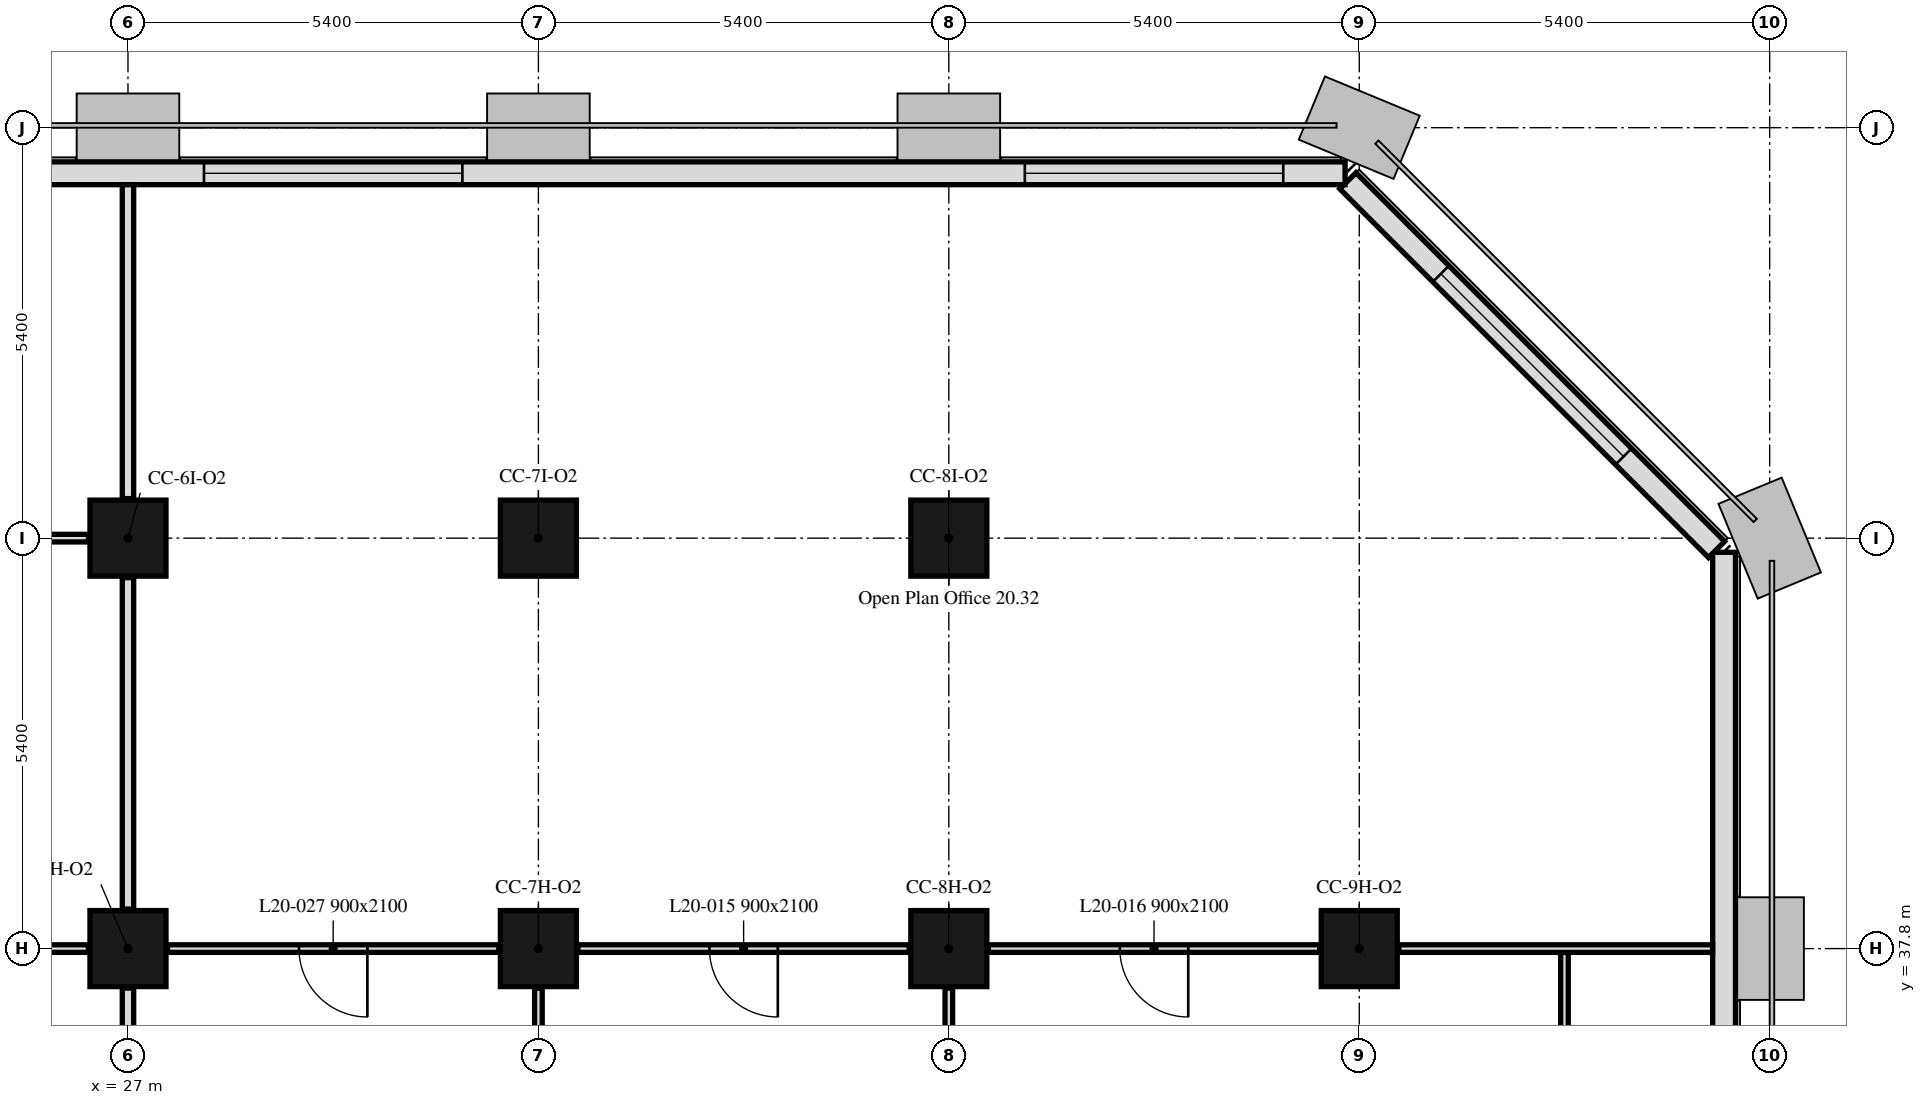
"""IFC4 building model, lengths in metres.
Left out: names, types, materials, properties, quantities, classifications, styles, units other than length and angle.
Written with IfcOpenShell. Run it as: python <this file> out.ifc"""

import sys

from ifc_helpers import new_model, si_unit, direction, frame, frame_2d, origin, origin_2d, place, context, subcontext, project, spatial, rectangle, extrude, element, fill, save


model = new_model("IFC4")
c1 = context("Model", 3, precision=1e-05, world=origin(), true_north=direction((0.0, 1.0)))
c2 = subcontext(c1, "Body", "Model", "MODEL_VIEW")
j1 = project(units=[si_unit("LENGTHUNIT", "METRE"), si_unit("PLANEANGLEUNIT", "RADIAN")], contexts=[c1])
p1 = place(None, origin())
s1 = spatial("IfcSite", under=j1, at=p1, CompositionType="ELEMENT")
p2 = place(p1, origin())
s2 = spatial("IfcBuilding", under=s1, at=p2, CompositionType="ELEMENT")
p3 = place(p2, frame((0.0, 0.0, 87.8)))
s3 = spatial("IfcBuildingStorey", under=s2, at=p3, CompositionType="ELEMENT", Elevation=87.8)
for number, where, z_axis, x_axis in (
    (1, (27.0, 37.8, 0.0), (0.0, 0.0, 1.0), (1.0, 0.0, 0.0)),
    (2, (32.4, 37.8, 0.0), (0.0, 0.0, 1.0), (1.0, 0.0, 0.0)),
    (3, (37.8, 37.8, 0.0), (0.0, 0.0, 1.0), (1.0, 0.0, 0.0)),
    (4, (43.2, 37.8, 0.0), (0.0, 0.0, 1.0), (1.0, 0.0, 0.0)),
    (5, (27.0, 43.2, 0.0), (0.0, 0.0, 1.0), (1.0, 0.0, 0.0)),
    (6, (32.4, 43.2, 0.0), (0.0, 0.0, 1.0), (1.0, 0.0, 0.0)),
    (7, (37.8, 43.2, 0.0), (0.0, 0.0, 1.0), (1.0, 0.0, 0.0)),
):
    element("IfcColumn", number, at=place(p3, frame(where, z_axis=z_axis, x_axis=x_axis)), inside=s3, PredefinedType="COLUMN", context=c2, shape_type="SweptSolid", body=[
        extrude(rectangle(XDim=1.0, YDim=1.0, at=origin_2d()), origin(), (0.0, 0.0, 1.0), 3.5),
    ])
p4 = place(p3, frame((48.0, 10.986, 0.0), z_axis=(0.0, 0.0, 1.0), x_axis=(0.0, 1.0, 0.0)))
e8 = element("IfcWall", 8, at=p4, inside=s3, PredefinedType="SOLIDWALL", context=c2, shape_type="SweptSolid", body=[
    extrude(rectangle(XDim=32.027, YDim=0.3, at=frame_2d((16.014, 0.0))), origin(), (0.0, 0.0, 1.0), 3.5),
])
p5 = place(p4, frame((1.164, 0.0, 0.9)))
e9 = element("IfcOpeningElement", 9, at=p5, cuts=e8, PredefinedType="OPENING", context=c2, shape_type="SweptSolid", body=[
    extrude(rectangle(XDim=1.1, YDim=1.7, at=frame_2d((0.55, 0.85))), frame((0.0, 0.16, 0.0), z_axis=(0.0, -1.0, 0.0), x_axis=(1.0, 0.0, 0.0)), (0.0, 0.0, 1.0), 0.32),
])
p6 = place(p4, frame((2.764, 0.0, 0.9)))
e10 = element("IfcOpeningElement", 10, at=p6, cuts=e8, PredefinedType="OPENING", context=c2, shape_type="SweptSolid", body=[
    extrude(rectangle(XDim=1.1, YDim=1.7, at=frame_2d((0.55, 0.85))), frame((0.0, 0.16, 0.0), z_axis=(0.0, -1.0, 0.0), x_axis=(1.0, 0.0, 0.0)), (0.0, 0.0, 1.0), 0.32),
])
p7 = place(p4, frame((11.614, 0.0, 0.9)))
e11 = element("IfcOpeningElement", 11, at=p7, cuts=e8, PredefinedType="OPENING", context=c2, shape_type="SweptSolid", body=[
    extrude(rectangle(XDim=3.4, YDim=1.7, at=frame_2d((1.7, 0.85))), frame((0.0, 0.16, 0.0), z_axis=(0.0, -1.0, 0.0), x_axis=(1.0, 0.0, 0.0)), (0.0, 0.0, 1.0), 0.32),
])
p8 = place(p4, frame((22.764, 0.0, 0.9)))
e12 = element("IfcOpeningElement", 12, at=p8, cuts=e8, PredefinedType="OPENING", context=c2, shape_type="SweptSolid", body=[
    extrude(rectangle(XDim=1.1, YDim=1.7, at=frame_2d((0.55, 0.85))), frame((0.0, 0.16, 0.0), z_axis=(0.0, -1.0, 0.0), x_axis=(1.0, 0.0, 0.0)), (0.0, 0.0, 1.0), 0.32),
])
p9 = place(p4, frame((24.364, 0.0, 0.9)))
e13 = element("IfcOpeningElement", 13, at=p9, cuts=e8, PredefinedType="OPENING", context=c2, shape_type="SweptSolid", body=[
    extrude(rectangle(XDim=1.1, YDim=1.7, at=frame_2d((0.55, 0.85))), frame((0.0, 0.16, 0.0), z_axis=(0.0, -1.0, 0.0), x_axis=(1.0, 0.0, 0.0)), (0.0, 0.0, 1.0), 0.32),
])
p10 = place(p3, frame((47.901, 43.051, 0.0), z_axis=(0.0, 0.0, 1.0), x_axis=(-0.707106781187, 0.707106781187, 0.0)))
e14 = element("IfcWall", 14, at=p10, inside=s3, PredefinedType="SOLIDWALL", context=c2, shape_type="SweptSolid", body=[
    extrude(rectangle(XDim=6.86, YDim=0.3, at=frame_2d((3.43, 0.0))), origin(), (0.0, 0.0, 1.0), 3.5),
])
p11 = place(p10, frame((1.73, 0.0, 0.9)))
e15 = element("IfcOpeningElement", 15, at=p11, cuts=e14, PredefinedType="OPENING", context=c2, shape_type="SweptSolid", body=[
    extrude(rectangle(XDim=3.4, YDim=1.7, at=frame_2d((1.7, 0.85))), frame((0.0, 0.16, 0.0), z_axis=(0.0, -1.0, 0.0), x_axis=(1.0, 0.0, 0.0)), (0.0, 0.0, 1.0), 0.32),
])
p12 = place(p3, frame((43.014, 48.0, 0.0), z_axis=(0.0, 0.0, 1.0), x_axis=(-1.0, 0.0, 0.0)))
e16 = element("IfcWall", 16, at=p12, inside=s3, PredefinedType="SOLIDWALL", context=c2, shape_type="SweptSolid", body=[
    extrude(rectangle(XDim=32.027, YDim=0.3, at=frame_2d((16.014, 0.0))), origin(), (0.0, 0.0, 1.0), 3.5),
])
p13 = place(p12, frame((0.814, 0.0, 0.9)))
e17 = element("IfcOpeningElement", 17, at=p13, cuts=e16, PredefinedType="OPENING", context=c2, shape_type="SweptSolid", body=[
    extrude(rectangle(XDim=3.4, YDim=1.7, at=frame_2d((1.7, 0.85))), frame((0.0, 0.16, 0.0), z_axis=(0.0, -1.0, 0.0), x_axis=(1.0, 0.0, 0.0)), (0.0, 0.0, 1.0), 0.32),
])
p14 = place(p12, frame((11.614, 0.0, 0.9)))
e18 = element("IfcOpeningElement", 18, at=p14, cuts=e16, PredefinedType="OPENING", context=c2, shape_type="SweptSolid", body=[
    extrude(rectangle(XDim=3.4, YDim=1.7, at=frame_2d((1.7, 0.85))), frame((0.0, 0.16, 0.0), z_axis=(0.0, -1.0, 0.0), x_axis=(1.0, 0.0, 0.0)), (0.0, 0.0, 1.0), 0.32),
])
p15 = place(p12, frame((22.414, 0.0, 0.9)))
e19 = element("IfcOpeningElement", 19, at=p15, cuts=e16, PredefinedType="OPENING", context=c2, shape_type="SweptSolid", body=[
    extrude(rectangle(XDim=3.4, YDim=1.7, at=frame_2d((1.7, 0.85))), frame((0.0, 0.16, 0.0), z_axis=(0.0, -1.0, 0.0), x_axis=(1.0, 0.0, 0.0)), (0.0, 0.0, 1.0), 0.32),
])
p16 = place(p3, frame((27.0, 35.175, 0.0), z_axis=(0.0, 0.0, 1.0), x_axis=(0.0, 1.0, 0.0)))
e20 = element("IfcWall", 20, at=p16, inside=s3, PredefinedType="PARTITIONING", context=c2, shape_type="SweptSolid", body=[
    extrude(rectangle(XDim=2.105, YDim=0.15, at=frame_2d((1.052, 0.0))), origin(), (0.0, 0.0, 1.0), 2.75),
])
p17 = place(p3, frame((26.48, 37.8, 0.0), z_axis=(0.0, 0.0, 1.0), x_axis=(-1.0, 0.0, 0.0)))
e21 = element("IfcWall", 21, at=p17, inside=s3, PredefinedType="PARTITIONING", context=c2, shape_type="SweptSolid", body=[
    extrude(rectangle(XDim=4.36, YDim=0.1, at=frame_2d((2.18, 0.0))), origin(), (0.0, 0.0, 1.0), 3.5),
])
p18 = place(p3, frame((26.48, 43.2, 0.0), z_axis=(0.0, 0.0, 1.0), x_axis=(-1.0, 0.0, 0.0)))
e22 = element("IfcWall", 22, at=p18, inside=s3, PredefinedType="PARTITIONING", context=c2, shape_type="SweptSolid", body=[
    extrude(rectangle(XDim=4.36, YDim=0.1, at=frame_2d((2.18, 0.0))), origin(), (0.0, 0.0, 1.0), 3.5),
])
p19 = place(p18, frame((1.73, 0.0, 0.0)))
e23 = element("IfcOpeningElement", 23, at=p19, cuts=e22, PredefinedType="OPENING", context=c2, shape_type="SweptSolid", body=[
    extrude(rectangle(XDim=0.9, YDim=2.1, at=frame_2d((0.45, 1.05))), frame((0.0, 0.05, 0.0), z_axis=(0.0, -1.0, 0.0), x_axis=(1.0, 0.0, 0.0)), (0.0, 0.0, 1.0), 0.1),
])
p20 = place(p3, frame((27.0, 38.32, 0.0), z_axis=(0.0, 0.0, 1.0), x_axis=(0.0, 1.0, 0.0)))
e24 = element("IfcWall", 24, at=p20, inside=s3, PredefinedType="PARTITIONING", context=c2, shape_type="SweptSolid", body=[
    extrude(rectangle(XDim=4.36, YDim=0.15, at=frame_2d((2.18, 0.0))), origin(), (0.0, 0.0, 1.0), 2.75),
])
p21 = place(p3, frame((27.0, 43.72, 0.0), z_axis=(0.0, 0.0, 1.0), x_axis=(0.0, 1.0, 0.0)))
e25 = element("IfcWall", 25, at=p21, inside=s3, PredefinedType="PARTITIONING", context=c2, shape_type="SweptSolid", body=[
    extrude(rectangle(XDim=4.129, YDim=0.15, at=frame_2d((2.064, 0.0))), origin(), (0.0, 0.0, 1.0), 2.75),
])
p22 = place(p3, frame((32.4, 35.175, 0.0), z_axis=(0.0, 0.0, 1.0), x_axis=(0.0, 1.0, 0.0)))
e26 = element("IfcWall", 26, at=p22, inside=s3, PredefinedType="PARTITIONING", context=c2, shape_type="SweptSolid", body=[
    extrude(rectangle(XDim=2.105, YDim=0.1, at=frame_2d((1.052, 0.0))), origin(), (0.0, 0.0, 1.0), 2.75),
])
p23 = place(p3, frame((31.88, 37.8, 0.0), z_axis=(0.0, 0.0, 1.0), x_axis=(-1.0, 0.0, 0.0)))
e27 = element("IfcWall", 27, at=p23, inside=s3, PredefinedType="PARTITIONING", context=c2, shape_type="SweptSolid", body=[
    extrude(rectangle(XDim=4.36, YDim=0.1, at=frame_2d((2.18, 0.0))), origin(), (0.0, 0.0, 1.0), 3.5),
])
p24 = place(p23, frame((1.73, 0.0, 0.0)))
e28 = element("IfcOpeningElement", 28, at=p24, cuts=e27, PredefinedType="OPENING", context=c2, shape_type="SweptSolid", body=[
    extrude(rectangle(XDim=0.9, YDim=2.1, at=frame_2d((0.45, 1.05))), frame((0.0, 0.05, 0.0), z_axis=(0.0, -1.0, 0.0), x_axis=(1.0, 0.0, 0.0)), (0.0, 0.0, 1.0), 0.1),
])
p25 = place(p3, frame((37.8, 35.175, 0.0), z_axis=(0.0, 0.0, 1.0), x_axis=(0.0, 1.0, 0.0)))
e29 = element("IfcWall", 29, at=p25, inside=s3, PredefinedType="PARTITIONING", context=c2, shape_type="SweptSolid", body=[
    extrude(rectangle(XDim=2.105, YDim=0.1, at=frame_2d((1.052, 0.0))), origin(), (0.0, 0.0, 1.0), 2.75),
])
p26 = place(p3, frame((37.28, 37.8, 0.0), z_axis=(0.0, 0.0, 1.0), x_axis=(-1.0, 0.0, 0.0)))
e30 = element("IfcWall", 30, at=p26, inside=s3, PredefinedType="PARTITIONING", context=c2, shape_type="SweptSolid", body=[
    extrude(rectangle(XDim=4.36, YDim=0.1, at=frame_2d((2.18, 0.0))), origin(), (0.0, 0.0, 1.0), 2.75),
])
p27 = place(p26, frame((1.73, 0.0, 0.0)))
e31 = element("IfcOpeningElement", 31, at=p27, cuts=e30, PredefinedType="OPENING", context=c2, shape_type="SweptSolid", body=[
    extrude(rectangle(XDim=0.9, YDim=2.1, at=frame_2d((0.45, 1.05))), frame((0.0, 0.05, 0.0), z_axis=(0.0, -1.0, 0.0), x_axis=(1.0, 0.0, 0.0)), (0.0, 0.0, 1.0), 0.1),
])
p28 = place(p3, frame((45.9, 35.175, 0.0), z_axis=(0.0, 0.0, 1.0), x_axis=(0.0, 1.0, 0.0)))
e32 = element("IfcWall", 32, at=p28, inside=s3, PredefinedType="PARTITIONING", context=c2, shape_type="SweptSolid", body=[
    extrude(rectangle(XDim=2.575, YDim=0.1, at=frame_2d((1.288, 0.0))), origin(), (0.0, 0.0, 1.0), 3.5),
])
p29 = place(p3, frame((42.68, 37.8, 0.0), z_axis=(0.0, 0.0, 1.0), x_axis=(-1.0, 0.0, 0.0)))
e33 = element("IfcWall", 33, at=p29, inside=s3, PredefinedType="PARTITIONING", context=c2, shape_type="SweptSolid", body=[
    extrude(rectangle(XDim=4.36, YDim=0.1, at=frame_2d((2.18, 0.0))), origin(), (0.0, 0.0, 1.0), 2.75),
])
p30 = place(p29, frame((1.73, 0.0, 0.0)))
e34 = element("IfcOpeningElement", 34, at=p30, cuts=e33, PredefinedType="OPENING", context=c2, shape_type="SweptSolid", body=[
    extrude(rectangle(XDim=0.9, YDim=2.1, at=frame_2d((0.45, 1.05))), frame((0.0, 0.05, 0.0), z_axis=(0.0, -1.0, 0.0), x_axis=(1.0, 0.0, 0.0)), (0.0, 0.0, 1.0), 0.1),
])
p31 = place(p3, frame((47.849, 37.8, 0.0), z_axis=(0.0, 0.0, 1.0), x_axis=(-1.0, 0.0, 0.0)))
e35 = element("IfcWall", 35, at=p31, inside=s3, PredefinedType="PARTITIONING", context=c2, shape_type="SweptSolid", body=[
    extrude(rectangle(XDim=4.129, YDim=0.1, at=frame_2d((2.064, 0.0))), origin(), (0.0, 0.0, 1.0), 2.75),
])
p32 = place(p11, origin())
e36 = element("IfcWindow", 36, at=p32, inside=s3, PartitioningType="SINGLE_PANEL", PredefinedType="WINDOW", context=c2, shape_type="SweptSolid", body=[
    extrude(rectangle(XDim=3.4, YDim=1.7, at=frame_2d((1.7, 0.85))), frame((0.0, 0.03, 0.0), z_axis=(0.0, -1.0, 0.0), x_axis=(1.0, 0.0, 0.0)), (0.0, 0.0, 1.0), 0.06),
])
fill(e15, e36)
p33 = place(p13, origin())
e37 = element("IfcWindow", 37, at=p33, inside=s3, PartitioningType="SINGLE_PANEL", PredefinedType="WINDOW", context=c2, shape_type="SweptSolid", body=[
    extrude(rectangle(XDim=3.4, YDim=1.7, at=frame_2d((1.7, 0.85))), frame((0.0, 0.03, 0.0), z_axis=(0.0, -1.0, 0.0), x_axis=(1.0, 0.0, 0.0)), (0.0, 0.0, 1.0), 0.06),
])
fill(e17, e37)
p34 = place(p14, origin())
e38 = element("IfcWindow", 38, at=p34, inside=s3, PartitioningType="SINGLE_PANEL", PredefinedType="WINDOW", context=c2, shape_type="SweptSolid", body=[
    extrude(rectangle(XDim=3.4, YDim=1.7, at=frame_2d((1.7, 0.85))), frame((0.0, 0.03, 0.0), z_axis=(0.0, -1.0, 0.0), x_axis=(1.0, 0.0, 0.0)), (0.0, 0.0, 1.0), 0.06),
])
fill(e18, e38)
p35 = place(p27, origin())
e39 = element("IfcDoor", 39, at=p35, inside=s3, OperationType="SINGLE_SWING_LEFT", PredefinedType="DOOR", context=c2, shape_type="SweptSolid", body=[
    extrude(rectangle(XDim=0.9, YDim=2.1, at=frame_2d((0.45, 1.05))), frame((0.0, 0.025, 0.0), z_axis=(0.0, -1.0, 0.0), x_axis=(1.0, 0.0, 0.0)), (0.0, 0.0, 1.0), 0.05),
])
fill(e31, e39)
p36 = place(p30, origin())
e40 = element("IfcDoor", 40, at=p36, inside=s3, OperationType="SINGLE_SWING_LEFT", PredefinedType="DOOR", context=c2, shape_type="SweptSolid", body=[
    extrude(rectangle(XDim=0.9, YDim=2.1, at=frame_2d((0.45, 1.05))), frame((0.0, 0.025, 0.0), z_axis=(0.0, -1.0, 0.0), x_axis=(1.0, 0.0, 0.0)), (0.0, 0.0, 1.0), 0.05),
])
fill(e34, e40)
p37 = place(p24, origin())
e41 = element("IfcDoor", 41, at=p37, inside=s3, OperationType="SINGLE_SWING_RIGHT", PredefinedType="DOOR", context=c2, shape_type="SweptSolid", body=[
    extrude(rectangle(XDim=0.9, YDim=2.1, at=frame_2d((0.45, 1.05))), frame((0.0, 0.025, 0.0), z_axis=(0.0, -1.0, 0.0), x_axis=(1.0, 0.0, 0.0)), (0.0, 0.0, 1.0), 0.05),
])
fill(e28, e41)
save(model, sys.argv[1])
